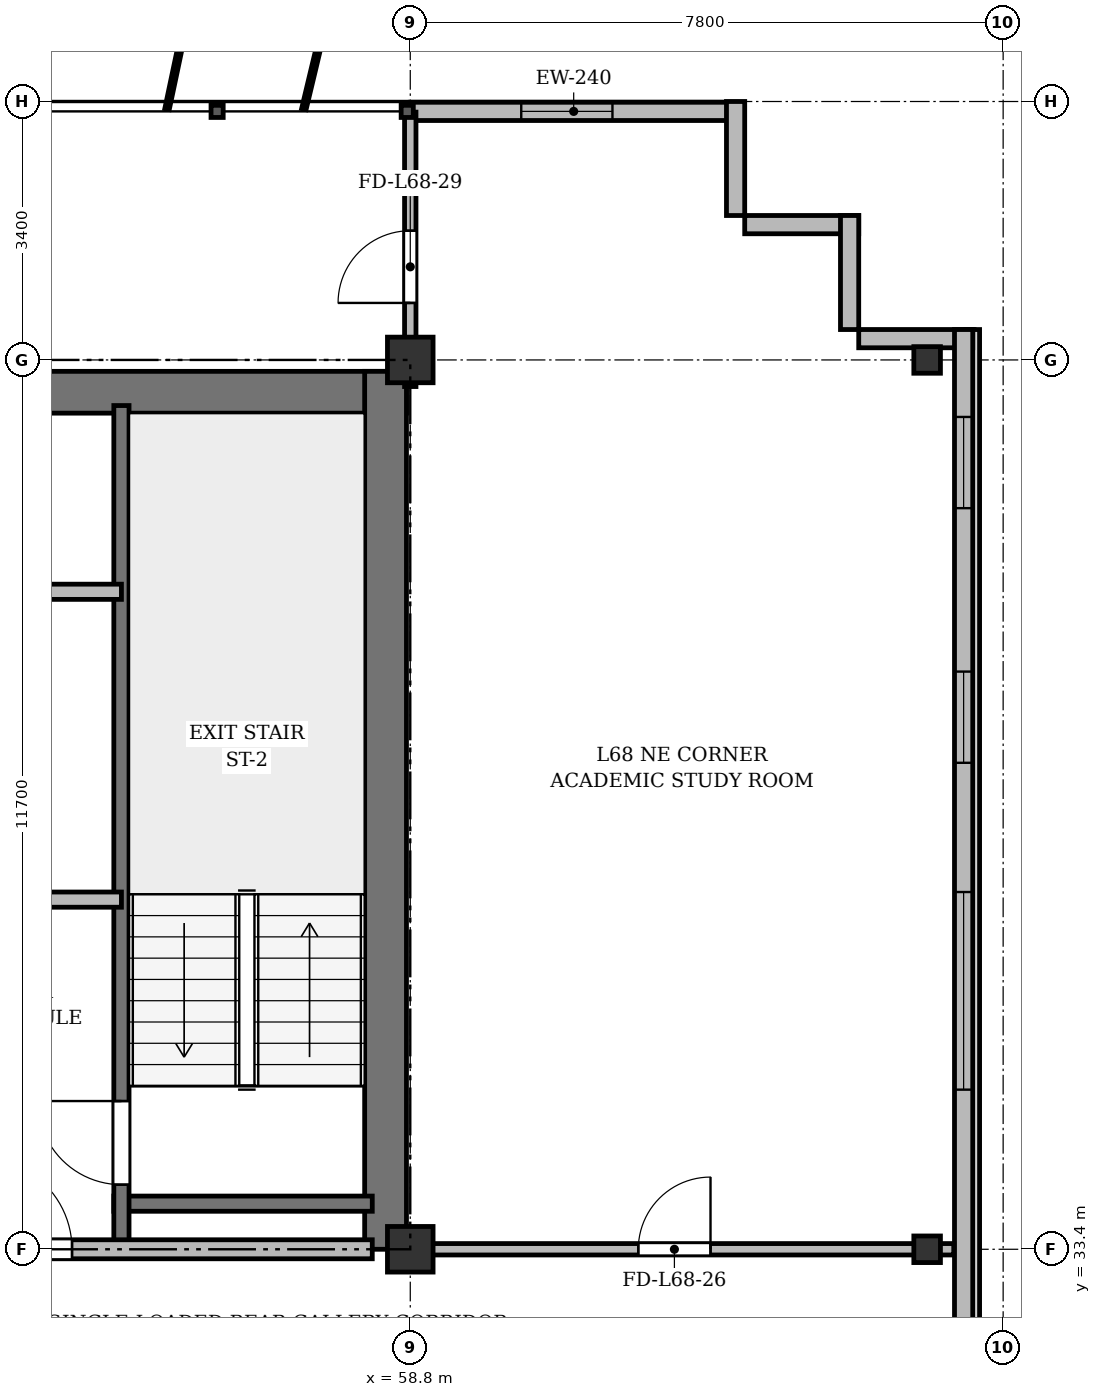
"""IFC4 building model, lengths in metres.
Left out: names, types, materials, properties, quantities, classifications, styles, units other than length and angle.
Written with IfcOpenShell. Run it as: python <this file> out.ifc"""

import sys

from ifc_helpers import new_model, si_unit, direction, frame, frame_2d, origin, origin_2d, place, context, subcontext, project, spatial, rectangle, i_section, extrude, source, transform, mapped, element, fill, save


model = new_model("IFC4")
c1 = context("Model", 3, precision=1e-05, world=origin(), true_north=direction((0.0, 1.0)))
c2 = subcontext(c1, "Body", "Model", "MODEL_VIEW")
j1 = project(units=[si_unit("LENGTHUNIT", "METRE"), si_unit("PLANEANGLEUNIT", "RADIAN")], contexts=[c1])
p1 = place(None, origin())
s1 = spatial("IfcSite", under=j1, at=p1, CompositionType="ELEMENT")
p2 = place(p1, origin())
s2 = spatial("IfcBuilding", under=s1, at=p2, CompositionType="ELEMENT")
p3 = place(p2, frame((0.0, 0.0, 263.1)))
s3 = spatial("IfcBuildingStorey", under=s2, at=p3, CompositionType="ELEMENT", Elevation=263.1)
m1 = source(origin(), c2, "Body", "SweptSolid", [
    extrude(rectangle(XDim=0.6, YDim=0.6, at=origin_2d()), origin(), (0.0, 0.0, 1.0), 3.6),
])
for number, where, z_axis, x_axis in (
    (1, (58.8, 33.4, 0.0), (0.0, 0.0, 1.0), (1.0, 0.0, 0.0)),
    (2, (58.8, 45.1, 0.0), (0.0, 0.0, 1.0), (1.0, 0.0, 0.0)),
):
    element("IfcColumn", number, at=place(p3, frame(where, z_axis=z_axis, x_axis=x_axis)), inside=s3, PredefinedType="COLUMN", context=c2, shape_type="MappedRepresentation", body=[
        mapped(m1, transform((0.0, 0.0, 0.0), x_axis=(1.0, 0.0, 0.0), y_axis=(0.0, 1.0, 0.0), z_axis=(0.0, 0.0, 1.0), scale=1.0)),
    ])
m2 = source(origin(), c2, "Body", "SweptSolid", [
    extrude(i_section(OverallWidth=0.35, OverallDepth=0.35, WebThickness=0.018, FlangeThickness=0.028, at=origin_2d()), origin(), (0.0, 0.0, 1.0), 3.6),
])
for number, where, z_axis, x_axis in (
    (3, (65.6, 33.4, 0.0), (0.0, 0.0, 1.0), (1.0, 0.0, 0.0)),
    (4, (65.6, 45.1, 0.0), (0.0, 0.0, 1.0), (1.0, 0.0, 0.0)),
):
    element("IfcColumn", number, at=place(p3, frame(where, z_axis=z_axis, x_axis=x_axis)), inside=s3, PredefinedType="COLUMN", context=c2, shape_type="MappedRepresentation", body=[
        mapped(m2, transform((0.0, 0.0, 0.0), x_axis=(1.0, 0.0, 0.0), y_axis=(0.0, 1.0, 0.0), z_axis=(0.0, 0.0, 1.0), scale=1.0)),
    ])
p4 = place(p3, frame((58.8, 48.37, 0.0), z_axis=(0.0, 0.0, 1.0), x_axis=(1.0, 0.0, 0.0)))
e5 = element("IfcWall", 5, at=p4, inside=s3, PredefinedType="SOLIDWALL", context=c2, shape_type="SweptSolid", body=[
    extrude(rectangle(XDim=4.3, YDim=0.24, at=frame_2d((2.15, 0.0))), origin(), (0.0, 0.0, 1.0), 3.37),
])
p5 = place(p4, frame((1.46, 0.0, 0.9)))
e6 = element("IfcOpeningElement", 6, at=p5, cuts=e5, PredefinedType="OPENING", context=c2, shape_type="SweptSolid", body=[
    extrude(rectangle(XDim=1.2, YDim=1.65, at=frame_2d((0.6, 0.825))), frame((0.0, 0.13, 0.0), z_axis=(0.0, -1.0, 0.0), x_axis=(1.0, 0.0, 0.0)), (0.0, 0.0, 1.0), 0.26),
])
for number, where, z_axis, x_axis in (
    (7, (63.08, 48.5, 0.0), (0.0, 0.0, 1.0), (0.0, -1.0, 0.0)),
    (8, (63.2, 46.88, 0.0), (0.0, 0.0, 1.0), (1.0, 0.0, 0.0)),
    (9, (64.58, 47.0, 0.0), (0.0, 0.0, 1.0), (0.0, -1.0, 0.0)),
    (10, (64.7, 45.38, 0.0), (0.0, 0.0, 1.0), (1.0, 0.0, 0.0)),
):
    element("IfcWall", number, at=place(p3, frame(where, z_axis=z_axis, x_axis=x_axis)), inside=s3, PredefinedType="SOLIDWALL", context=c2, shape_type="SweptSolid", body=[
        extrude(rectangle(XDim=1.5, YDim=0.24, at=frame_2d((0.75, 0.0))), origin(), (0.0, 0.0, 1.0), 3.37),
    ])
p6 = place(p3, frame((66.08, 45.5, 0.0), z_axis=(0.0, 0.0, 1.0), x_axis=(0.0, -1.0, 0.0)))
e11 = element("IfcWall", 11, at=p6, inside=s3, PredefinedType="SOLIDWALL", context=c2, shape_type="SweptSolid", body=[
    extrude(rectangle(XDim=39.0, YDim=0.24, at=frame_2d((19.5, 0.0))), origin(), (0.0, 0.0, 1.0), 3.37),
])
p7 = place(p6, frame((36.35, 0.0, 0.92)))
e12 = element("IfcOpeningElement", 12, at=p7, cuts=e11, PredefinedType="OPENING", context=c2, shape_type="SweptSolid", body=[
    extrude(rectangle(XDim=1.2, YDim=1.65, at=frame_2d((0.6, 0.825))), frame((0.0, 0.13, 0.0), z_axis=(0.0, -1.0, 0.0), x_axis=(1.0, 0.0, 0.0)), (0.0, 0.0, 1.0), 0.26),
])
p8 = place(p6, frame((32.8, 0.0, 0.92)))
e13 = element("IfcOpeningElement", 13, at=p8, cuts=e11, PredefinedType="OPENING", context=c2, shape_type="SweptSolid", body=[
    extrude(rectangle(XDim=2.6, YDim=1.9, at=frame_2d((1.3, 0.95))), frame((0.0, 0.13, 0.0), z_axis=(0.0, -1.0, 0.0), x_axis=(1.0, 0.0, 0.0)), (0.0, 0.0, 1.0), 0.26),
])
p9 = place(p6, frame((28.6, 0.0, 0.92)))
e14 = element("IfcOpeningElement", 14, at=p9, cuts=e11, PredefinedType="OPENING", context=c2, shape_type="SweptSolid", body=[
    extrude(rectangle(XDim=2.6, YDim=1.9, at=frame_2d((1.3, 0.95))), frame((0.0, 0.13, 0.0), z_axis=(0.0, -1.0, 0.0), x_axis=(1.0, 0.0, 0.0)), (0.0, 0.0, 1.0), 0.26),
])
p10 = place(p6, frame((21.4, 0.0, 0.92)))
e15 = element("IfcOpeningElement", 15, at=p10, cuts=e11, PredefinedType="OPENING", context=c2, shape_type="SweptSolid", body=[
    extrude(rectangle(XDim=2.6, YDim=1.9, at=frame_2d((1.3, 0.95))), frame((0.0, 0.13, 0.0), z_axis=(0.0, -1.0, 0.0), x_axis=(1.0, 0.0, 0.0)), (0.0, 0.0, 1.0), 0.26),
])
p11 = place(p6, frame((7.4, 0.0, 0.92)))
e16 = element("IfcOpeningElement", 16, at=p11, cuts=e11, PredefinedType="OPENING", context=c2, shape_type="SweptSolid", body=[
    extrude(rectangle(XDim=2.6, YDim=1.9, at=frame_2d((1.3, 0.95))), frame((0.0, 0.13, 0.0), z_axis=(0.0, -1.0, 0.0), x_axis=(1.0, 0.0, 0.0)), (0.0, 0.0, 1.0), 0.26),
])
p12 = place(p6, frame((4.5, 0.0, 0.92)))
e17 = element("IfcOpeningElement", 17, at=p12, cuts=e11, PredefinedType="OPENING", context=c2, shape_type="SweptSolid", body=[
    extrude(rectangle(XDim=1.2, YDim=1.65, at=frame_2d((0.6, 0.825))), frame((0.0, 0.13, 0.0), z_axis=(0.0, -1.0, 0.0), x_axis=(1.0, 0.0, 0.0)), (0.0, 0.0, 1.0), 0.26),
])
p13 = place(p6, frame((1.15, 0.0, 0.92)))
e18 = element("IfcOpeningElement", 18, at=p13, cuts=e11, PredefinedType="OPENING", context=c2, shape_type="SweptSolid", body=[
    extrude(rectangle(XDim=1.2, YDim=1.65, at=frame_2d((0.6, 0.825))), frame((0.0, 0.13, 0.0), z_axis=(0.0, -1.0, 0.0), x_axis=(1.0, 0.0, 0.0)), (0.0, 0.0, 1.0), 0.26),
])
p14 = place(p3, frame((15.65, 44.675, 0.0), z_axis=(0.0, 0.0, 1.0), x_axis=(1.0, 0.0, 0.0)))
e19 = element("IfcWall", 19, at=p14, inside=s3, PredefinedType="SHEAR", context=c2, shape_type="SweptSolid", body=[
    extrude(rectangle(XDim=43.1, YDim=0.55, at=frame_2d((21.55, 0.0))), origin(), (0.0, 0.0, 1.0), 3.37),
])
p15 = place(p3, frame((58.475, 33.4, 0.0), z_axis=(0.0, 0.0, 1.0), x_axis=(0.0, 1.0, 0.0)))
e20 = element("IfcWall", 20, at=p15, inside=s3, PredefinedType="SHEAR", context=c2, shape_type="SweptSolid", body=[
    extrude(rectangle(XDim=11.55, YDim=0.55, at=frame_2d((5.775, 0.0))), origin(), (0.0, 0.0, 1.0), 3.37),
])
p16 = place(p3, frame((54.9, 34.0, 0.0), z_axis=(0.0, 0.0, 1.0), x_axis=(1.0, 0.0, 0.0)))
e21 = element("IfcWall", 21, at=p16, inside=s3, PredefinedType="SHEAR", context=c2, shape_type="SweptSolid", body=[
    extrude(rectangle(XDim=3.4, YDim=0.2, at=frame_2d((1.7, 0.0))), origin(), (0.0, 0.0, 1.0), 3.37),
])
p17 = place(p3, frame((55.0, 33.4, 0.0), z_axis=(0.0, 0.0, 1.0), x_axis=(0.0, 1.0, 0.0)))
e22 = element("IfcWall", 22, at=p17, inside=s3, PredefinedType="SHEAR", context=c2, shape_type="SweptSolid", body=[
    extrude(rectangle(XDim=11.1, YDim=0.2, at=frame_2d((5.55, 0.0))), origin(), (0.0, 0.0, 1.0), 3.37),
])
p18 = place(p17, frame((0.85, 0.0, 0.0)))
e23 = element("IfcOpeningElement", 23, at=p18, cuts=e22, PredefinedType="OPENING", context=c2, shape_type="SweptSolid", body=[
    extrude(rectangle(XDim=1.1, YDim=2.15, at=frame_2d((0.55, 1.075))), frame((0.0, 0.11, 0.0), z_axis=(0.0, -1.0, 0.0), x_axis=(1.0, 0.0, 0.0)), (0.0, 0.0, 1.0), 0.22),
])
p19 = place(p3, frame((47.15, 42.05, 0.0), z_axis=(0.0, 0.0, 1.0), x_axis=(1.0, 0.0, 0.0)))
e24 = element("IfcWall", 24, at=p19, inside=s3, PredefinedType="SOLIDWALL", context=c2, shape_type="SweptSolid", body=[
    extrude(rectangle(XDim=7.85, YDim=0.2, at=frame_2d((3.925, 0.0))), origin(), (0.0, 0.0, 1.0), 2.87),
])
p20 = place(p19, frame((0.75, 0.0, 0.0)))
e25 = element("IfcOpeningElement", 25, at=p20, cuts=e24, PredefinedType="OPENING", context=c2, shape_type="SweptSolid", body=[
    extrude(rectangle(XDim=0.9, YDim=2.1, at=frame_2d((0.45, 1.05))), frame((0.0, 0.11, 0.0), z_axis=(0.0, -1.0, 0.0), x_axis=(1.0, 0.0, 0.0)), (0.0, 0.0, 1.0), 0.22),
])
p21 = place(p19, frame((3.85, 0.0, 0.0)))
e26 = element("IfcOpeningElement", 26, at=p21, cuts=e24, PredefinedType="OPENING", context=c2, shape_type="SweptSolid", body=[
    extrude(rectangle(XDim=0.9, YDim=2.1, at=frame_2d((0.45, 1.05))), frame((0.0, 0.11, 0.0), z_axis=(0.0, -1.0, 0.0), x_axis=(1.0, 0.0, 0.0)), (0.0, 0.0, 1.0), 0.22),
])
p22 = place(p3, frame((52.45, 38.0, 0.0), z_axis=(0.0, 0.0, 1.0), x_axis=(1.0, 0.0, 0.0)))
e27 = element("IfcWall", 27, at=p22, inside=s3, PredefinedType="PARTITIONING", context=c2, shape_type="SweptSolid", body=[
    extrude(rectangle(XDim=2.55, YDim=0.2, at=frame_2d((1.275, 0.0))), origin(), (0.0, 0.0, 1.0), 3.37),
])
p23 = place(p3, frame((47.15, 33.4, 0.0), z_axis=(0.0, 0.0, 1.0), x_axis=(1.0, 0.0, 0.0)))
e28 = element("IfcWall", 28, at=p23, inside=s3, PredefinedType="PARTITIONING", context=c2, shape_type="SweptSolid", body=[
    extrude(rectangle(XDim=11.15, YDim=0.25, at=frame_2d((5.575, 0.0))), origin(), (0.0, 0.0, 1.0), 2.92),
])
p24 = place(p23, frame((0.7, 0.0, 0.0)))
e29 = element("IfcOpeningElement", 29, at=p24, cuts=e28, PredefinedType="OPENING", context=c2, shape_type="SweptSolid", body=[
    extrude(rectangle(XDim=0.95, YDim=2.15, at=frame_2d((0.475, 1.075))), frame((0.0, 0.135, 0.0), z_axis=(0.0, -1.0, 0.0), x_axis=(1.0, 0.0, 0.0)), (0.0, 0.0, 1.0), 0.27),
])
p25 = place(p23, frame((6.0, 0.0, 0.0)))
e30 = element("IfcOpeningElement", 30, at=p25, cuts=e28, PredefinedType="OPENING", context=c2, shape_type="SweptSolid", body=[
    extrude(rectangle(XDim=1.2, YDim=2.15, at=frame_2d((0.6, 1.075))), frame((0.0, 0.135, 0.0), z_axis=(0.0, -1.0, 0.0), x_axis=(1.0, 0.0, 0.0)), (0.0, 0.0, 1.0), 0.27),
])
p26 = place(p3, frame((58.8, 33.4, 0.0), z_axis=(0.0, 0.0, 1.0), x_axis=(1.0, 0.0, 0.0)))
e31 = element("IfcWall", 31, at=p26, inside=s3, PredefinedType="PARTITIONING", context=c2, shape_type="SweptSolid", body=[
    extrude(rectangle(XDim=7.15, YDim=0.15, at=frame_2d((3.575, 0.0))), origin(), (0.0, 0.0, 1.0), 2.92),
])
p27 = place(p26, frame((3.0, 0.0, 0.0)))
e32 = element("IfcOpeningElement", 32, at=p27, cuts=e31, PredefinedType="OPENING", context=c2, shape_type="SweptSolid", body=[
    extrude(rectangle(XDim=0.95, YDim=2.15, at=frame_2d((0.475, 1.075))), frame((0.0, 0.085, 0.0), z_axis=(0.0, -1.0, 0.0), x_axis=(1.0, 0.0, 0.0)), (0.0, 0.0, 1.0), 0.17),
])
p28 = place(p3, frame((58.8, 44.75, 0.0), z_axis=(0.0, 0.0, 1.0), x_axis=(0.0, 1.0, 0.0)))
e33 = element("IfcWall", 33, at=p28, inside=s3, PredefinedType="PARTITIONING", context=c2, shape_type="SweptSolid", body=[
    extrude(rectangle(XDim=3.61, YDim=0.15, at=frame_2d((1.805, 0.0))), origin(), (0.0, 0.0, 1.0), 2.87),
])
p29 = place(p28, frame((1.1, 0.0, 0.0)))
e34 = element("IfcOpeningElement", 34, at=p29, cuts=e33, PredefinedType="OPENING", context=c2, shape_type="SweptSolid", body=[
    extrude(rectangle(XDim=0.95, YDim=2.15, at=frame_2d((0.475, 1.075))), frame((0.0, 0.085, 0.0), z_axis=(0.0, -1.0, 0.0), x_axis=(1.0, 0.0, 0.0)), (0.0, 0.0, 1.0), 0.17),
])
m3 = source(origin(), c2, "Body", "SweptSolid", [
    extrude(rectangle(XDim=1.2, YDim=1.65, at=frame_2d((0.6, 0.825))), frame((0.0, 0.03, 0.0), z_axis=(0.0, -1.0, 0.0), x_axis=(1.0, 0.0, 0.0)), (0.0, 0.0, 1.0), 0.06),
])
p30 = place(p5, origin())
e35 = element("IfcWindow", 35, at=p30, inside=s3, PartitioningType="SINGLE_PANEL", PredefinedType="WINDOW", context=c2, shape_type="MappedRepresentation", body=[
    mapped(m3, transform((0.0, 0.0, 0.0), x_axis=(1.0, 0.0, 0.0), y_axis=(0.0, 1.0, 0.0), z_axis=(0.0, 0.0, 1.0), scale=1.0)),
])
fill(e6, e35)
m4 = source(origin(), c2, "Body", "SweptSolid", [
    extrude(rectangle(XDim=2.6, YDim=1.9, at=frame_2d((1.3, 0.95))), frame((0.0, 0.03, 0.0), z_axis=(0.0, -1.0, 0.0), x_axis=(1.0, 0.0, 0.0)), (0.0, 0.0, 1.0), 0.06),
])
p31 = place(p11, origin())
e36 = element("IfcWindow", 36, at=p31, inside=s3, PartitioningType="SINGLE_PANEL", PredefinedType="WINDOW", context=c2, shape_type="MappedRepresentation", body=[
    mapped(m4, transform((0.0, 0.0, 0.0), x_axis=(1.0, 0.0, 0.0), y_axis=(0.0, 1.0, 0.0), z_axis=(0.0, 0.0, 1.0), scale=1.0)),
])
fill(e16, e36)
p32 = place(p12, origin())
e37 = element("IfcWindow", 37, at=p32, inside=s3, PartitioningType="SINGLE_PANEL", PredefinedType="WINDOW", context=c2, shape_type="MappedRepresentation", body=[
    mapped(m3, transform((0.0, 0.0, 0.0), x_axis=(1.0, 0.0, 0.0), y_axis=(0.0, 1.0, 0.0), z_axis=(0.0, 0.0, 1.0), scale=1.0)),
])
fill(e17, e37)
p33 = place(p13, origin())
e38 = element("IfcWindow", 38, at=p33, inside=s3, PartitioningType="SINGLE_PANEL", PredefinedType="WINDOW", context=c2, shape_type="MappedRepresentation", body=[
    mapped(m3, transform((0.0, 0.0, 0.0), x_axis=(1.0, 0.0, 0.0), y_axis=(0.0, 1.0, 0.0), z_axis=(0.0, 0.0, 1.0), scale=1.0)),
])
fill(e18, e38)
m5 = source(origin(), c2, "Body", "SweptSolid", [
    extrude(rectangle(XDim=1.1, YDim=2.15, at=frame_2d((0.55, 1.075))), frame((0.0, 0.025, 0.0), z_axis=(0.0, -1.0, 0.0), x_axis=(1.0, 0.0, 0.0)), (0.0, 0.0, 1.0), 0.05),
])
p34 = place(p18, origin())
e39 = element("IfcDoor", 39, at=p34, inside=s3, OperationType="SINGLE_SWING_RIGHT", PredefinedType="DOOR", context=c2, shape_type="MappedRepresentation", body=[
    mapped(m5, transform((0.0, 0.0, 0.0), x_axis=(1.0, 0.0, 0.0), y_axis=(0.0, 1.0, 0.0), z_axis=(0.0, 0.0, 1.0), scale=1.0)),
])
fill(e23, e39)
m6 = source(origin(), c2, "Body", "SweptSolid", [
    extrude(rectangle(XDim=1.2, YDim=2.15, at=frame_2d((0.6, 1.075))), frame((0.0, 0.025, 0.0), z_axis=(0.0, -1.0, 0.0), x_axis=(1.0, 0.0, 0.0)), (0.0, 0.0, 1.0), 0.05),
])
p35 = place(p25, origin())
e40 = element("IfcDoor", 40, at=p35, inside=s3, OperationType="SINGLE_SWING_LEFT", PredefinedType="DOOR", context=c2, shape_type="MappedRepresentation", body=[
    mapped(m6, transform((0.0, 0.0, 0.0), x_axis=(1.0, 0.0, 0.0), y_axis=(0.0, 1.0, 0.0), z_axis=(0.0, 0.0, 1.0), scale=1.0)),
])
fill(e30, e40)
m7 = source(origin(), c2, "Body", "SweptSolid", [
    extrude(rectangle(XDim=0.95, YDim=2.15, at=frame_2d((0.475, 1.075))), frame((0.0, 0.025, 0.0), z_axis=(0.0, -1.0, 0.0), x_axis=(1.0, 0.0, 0.0)), (0.0, 0.0, 1.0), 0.05),
])
p36 = place(p27, origin())
e41 = element("IfcDoor", 41, at=p36, inside=s3, OperationType="SINGLE_SWING_RIGHT", PredefinedType="DOOR", context=c2, shape_type="MappedRepresentation", body=[
    mapped(m7, transform((0.0, 0.0, 0.0), x_axis=(1.0, 0.0, 0.0), y_axis=(0.0, 1.0, 0.0), z_axis=(0.0, 0.0, 1.0), scale=1.0)),
])
fill(e32, e41)
p37 = place(p29, origin())
e42 = element("IfcDoor", 42, at=p37, inside=s3, OperationType="SINGLE_SWING_LEFT", PredefinedType="DOOR", context=c2, shape_type="MappedRepresentation", body=[
    mapped(m7, transform((0.0, 0.0, 0.0), x_axis=(1.0, 0.0, 0.0), y_axis=(0.0, 1.0, 0.0), z_axis=(0.0, 0.0, 1.0), scale=1.0)),
])
fill(e34, e42)
save(model, sys.argv[1])
